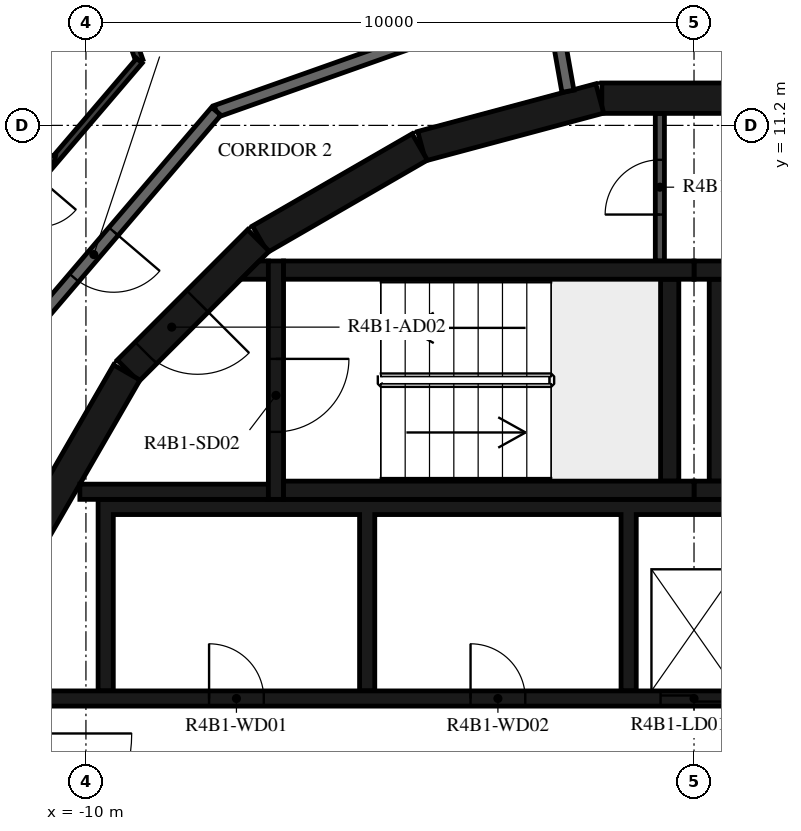
"""IFC4 building model, lengths in metres.
Left out: names, types, materials, properties, quantities, classifications, styles, units other than length and angle.
Written with IfcOpenShell. Run it as: python <this file> out.ifc"""

import sys

from ifc_helpers import new_model, si_unit, direction, frame, frame_2d, origin, place, context, subcontext, project, spatial, polyline, rectangle, outline, extrude, element, fill, save


model = new_model("IFC4")
c1 = context("Model", 3, precision=1e-05, world=origin(), true_north=direction((0.0, 1.0)))
c2 = subcontext(c1, "Body", "Model", "MODEL_VIEW")
j1 = project(units=[si_unit("LENGTHUNIT", "METRE"), si_unit("PLANEANGLEUNIT", "RADIAN")], contexts=[c1])
p1 = place(None, origin())
s1 = spatial("IfcSite", under=j1, at=p1, CompositionType="ELEMENT")
p2 = place(p1, origin())
s2 = spatial("IfcBuilding", under=s1, at=p2, CompositionType="ELEMENT")
p3 = place(p2, frame((0.0, 0.0, 162.2)))
s3 = spatial("IfcBuildingStorey", under=s2, at=p3, CompositionType="ELEMENT", Elevation=162.2)
for number, where, z_axis, x_axis in (
    (1, (1.516, 11.647, 0.0), (0.0, 0.0, 1.0), (-1.0, 0.0, 0.0)),
    (2, (-1.55, 11.643, 0.0), (0.0, 0.0, 1.0), (-0.966, -0.259, 0.0)),
    (3, (-4.51, 10.845, 0.0), (0.0, 0.0, 1.0), (-0.866, -0.5, 0.0)),
):
    element("IfcWall", number, at=place(p3, frame(where, z_axis=z_axis, x_axis=x_axis)), inside=s3, PredefinedType="SHEAR", context=c2, shape_type="SweptSolid", body=[
        extrude(rectangle(XDim=3.033, YDim=0.5, at=frame_2d((1.516, 0.0))), origin(), (0.0, 0.0, 1.0), 3.12),
    ])
p4 = place(p3, frame((-7.164, 9.308, 0.0), z_axis=(0.0, 0.0, 1.0), x_axis=(-0.707106781187, -0.707106781187, 0.0)))
e4 = element("IfcWall", 4, at=p4, inside=s3, PredefinedType="SHEAR", context=c2, shape_type="SweptSolid", body=[
    extrude(rectangle(XDim=3.032, YDim=0.5, at=frame_2d((1.516, 0.0))), origin(), (0.0, 0.0, 1.0), 3.12),
])
p5 = place(p4, frame((1.416, 0.0, 0.0)))
e5 = element("IfcOpeningElement", 5, at=p5, cuts=e4, PredefinedType="OPENING", context=c2, shape_type="SweptSolid", body=[
    extrude(rectangle(XDim=1.2, YDim=2.1, at=frame_2d((0.6, 1.05))), frame((0.0, 0.26, 0.0), z_axis=(0.0, -1.0, 0.0), x_axis=(1.0, 0.0, 0.0)), (0.0, 0.0, 1.0), 0.52),
])
p6 = place(p3, frame((-9.329, 7.137, 0.0), z_axis=(0.0, 0.0, 1.0), x_axis=(-0.500087131594, -0.865975092491, 0.0)))
e6 = element("IfcWall", 6, at=p6, inside=s3, PredefinedType="SHEAR", context=c2, shape_type="SweptSolid", body=[
    extrude(rectangle(XDim=3.033, YDim=0.5, at=frame_2d((1.516, 0.0))), origin(), (0.0, 0.0, 1.0), 3.12),
])
for number, where, z_axis, x_axis in (
    (7, (0.0, 5.2, 0.0), (0.0, 0.0, 1.0), (1.0, 0.0, 0.0)),
    (8, (0.0, 8.82, 0.0), (0.0, 0.0, 1.0), (1.0, 0.0, 0.0)),
):
    element("IfcWall", number, at=place(p3, frame(where, z_axis=z_axis, x_axis=x_axis)), inside=s3, PredefinedType="SHEAR", context=c2, shape_type="SweptSolid", body=[
        extrude(rectangle(XDim=6.75, YDim=0.3, at=frame_2d((3.375, 0.0))), origin(), (0.0, 0.0, 1.0), 3.12),
    ])
p7 = place(p3, frame((0.4, 5.35, 0.0), z_axis=(0.0, 0.0, 1.0), x_axis=(0.0, 1.0, 0.0)))
e9 = element("IfcWall", 9, at=p7, inside=s3, PredefinedType="SHEAR", context=c2, shape_type="SweptSolid", body=[
    extrude(rectangle(XDim=3.32, YDim=0.3, at=frame_2d((1.66, 0.0))), origin(), (0.0, 0.0, 1.0), 3.12),
])
for number, where, z_axis, x_axis in (
    (10, (-6.75, 5.2, 0.0), (0.0, 0.0, 1.0), (1.0, 0.0, 0.0)),
    (11, (-6.75, 8.82, 0.0), (0.0, 0.0, 1.0), (1.0, 0.0, 0.0)),
):
    element("IfcWall", number, at=place(p3, frame(where, z_axis=z_axis, x_axis=x_axis)), inside=s3, PredefinedType="SHEAR", context=c2, shape_type="SweptSolid", body=[
        extrude(rectangle(XDim=6.75, YDim=0.3, at=frame_2d((3.375, 0.0))), origin(), (0.0, 0.0, 1.0), 3.12),
    ])
p8 = place(p3, frame((-0.4, 5.35, 0.0), z_axis=(0.0, 0.0, 1.0), x_axis=(0.0, 1.0, 0.0)))
e12 = element("IfcWall", 12, at=p8, inside=s3, PredefinedType="SHEAR", context=c2, shape_type="SweptSolid", body=[
    extrude(rectangle(XDim=3.32, YDim=0.3, at=frame_2d((1.66, 0.0))), origin(), (0.0, 0.0, 1.0), 3.12),
])
p9 = place(p3, frame((-6.875, 8.97, 0.0), z_axis=(0.0, 0.0, 1.0), x_axis=(0.0, -1.0, 0.0)))
e13 = element("IfcWall", 13, at=p9, inside=s3, PredefinedType="SHEAR", context=c2, shape_type="SweptSolid", body=[
    extrude(rectangle(XDim=3.92, YDim=0.25, at=frame_2d((1.96, 0.0))), origin(), (0.0, 0.0, 1.0), 3.12),
])
p10 = place(p9, frame((1.61, 0.0, 0.0)))
e14 = element("IfcOpeningElement", 14, at=p10, cuts=e13, PredefinedType="OPENING", context=c2, shape_type="SweptSolid", body=[
    extrude(rectangle(XDim=1.2, YDim=2.1, at=frame_2d((0.6, 1.05))), frame((0.0, 0.135, 0.0), z_axis=(0.0, -1.0, 0.0), x_axis=(1.0, 0.0, 0.0)), (0.0, 0.0, 1.0), 0.27),
])
p11 = place(p3, frame((-7.0, 5.175, 0.0), z_axis=(0.0, 0.0, 1.0), x_axis=(-1.0, 0.0, 0.0)))
e15 = element("IfcWall", 15, at=p11, inside=s3, PredefinedType="SHEAR", context=c2, shape_type="SweptSolid", body=[
    extrude(rectangle(XDim=3.1, YDim=0.25, at=frame_2d((1.55, 0.0))), origin(), (0.0, 0.0, 1.0), 3.12),
])
p12 = place(p3, origin())
e16 = element("IfcWall", 16, at=p12, inside=s3, PredefinedType="SHEAR", context=c2, shape_type="SweptSolid", body=[
    extrude(outline(polyline([(-7.148, 8.97), (-7.0, 8.97), (-7.0, 8.67), (-7.448, 8.67), (-7.148, 8.97)])), origin(), (0.0, 0.0, 1.0), 3.12),
])
p13 = place(p3, origin())
e17 = element("IfcWall", 17, at=p13, inside=s3, PredefinedType="SHEAR", context=c2, shape_type="SweptSolid", body=[
    extrude(outline(polyline([(-9.55, 4.8), (-5.5, 4.8), (-5.5, 1.9), (-5.25, 1.9), (-5.25, 4.8), (-1.2, 4.8), (-1.2, 1.9), (-0.95, 1.9), (-0.95, 4.8), (0.95, 4.8), (0.95, 1.9), (1.2, 1.9), (1.2, 4.8), (3.1, 4.8), (3.1, 1.9), (3.35, 1.9), (3.35, 4.8), (5.25, 4.8), (5.25, 1.9), (5.5, 1.9), (5.5, 4.8), (7.4, 4.8), (7.4, 1.9), (7.65, 1.9), (7.65, 4.8), (9.55, 4.8), (9.55, 1.9), (9.8, 1.9), (9.8, 4.8), (9.8, 5.05), (-9.8, 5.05), (-9.8, 4.8), (-9.8, 1.9), (-9.55, 1.9), (-9.55, 4.8)])), origin(), (0.0, 0.0, 1.0), 3.12),
])
p14 = place(p3, frame((-11.28, 1.775, 0.0), z_axis=(0.0, 0.0, 1.0), x_axis=(1.0, 0.0, 0.0)))
e18 = element("IfcWall", 18, at=p14, inside=s3, PredefinedType="SHEAR", context=c2, shape_type="SweptSolid", body=[
    extrude(rectangle(XDim=14.38, YDim=0.25, at=frame_2d((7.19, 0.0))), origin(), (0.0, 0.0, 1.0), 3.12),
])
p15 = place(p14, frame((10.73, 0.0, 0.0)))
e19 = element("IfcOpeningElement", 19, at=p15, cuts=e18, PredefinedType="OPENING", context=c2, shape_type="SweptSolid", body=[
    extrude(rectangle(XDim=1.1, YDim=2.1, at=frame_2d((0.55, 1.05))), frame((0.0, 0.135, 0.0), z_axis=(0.0, -1.0, 0.0), x_axis=(1.0, 0.0, 0.0)), (0.0, 0.0, 1.0), 0.27),
])
p16 = place(p14, frame((12.88, 0.0, 0.0)))
e20 = element("IfcOpeningElement", 20, at=p16, cuts=e18, PredefinedType="OPENING", context=c2, shape_type="SweptSolid", body=[
    extrude(rectangle(XDim=1.1, YDim=2.1, at=frame_2d((0.55, 1.05))), frame((0.0, 0.135, 0.0), z_axis=(0.0, -1.0, 0.0), x_axis=(1.0, 0.0, 0.0)), (0.0, 0.0, 1.0), 0.27),
])
p17 = place(p14, frame((3.305, 0.0, 0.0)))
e21 = element("IfcOpeningElement", 21, at=p17, cuts=e18, PredefinedType="OPENING", context=c2, shape_type="SweptSolid", body=[
    extrude(rectangle(XDim=0.9, YDim=2.1, at=frame_2d((0.45, 1.05))), frame((0.0, 0.135, 0.0), z_axis=(0.0, -1.0, 0.0), x_axis=(1.0, 0.0, 0.0)), (0.0, 0.0, 1.0), 0.27),
])
p18 = place(p14, frame((7.605, 0.0, 0.0)))
e22 = element("IfcOpeningElement", 22, at=p18, cuts=e18, PredefinedType="OPENING", context=c2, shape_type="SweptSolid", body=[
    extrude(rectangle(XDim=0.9, YDim=2.1, at=frame_2d((0.45, 1.05))), frame((0.0, 0.135, 0.0), z_axis=(0.0, -1.0, 0.0), x_axis=(1.0, 0.0, 0.0)), (0.0, 0.0, 1.0), 0.27),
])
p19 = place(p3, frame((-0.562, 8.97, 0.0), z_axis=(0.0, 0.0, 1.0), x_axis=(0.0, 1.0, 0.0)))
e23 = element("IfcWall", 23, at=p19, inside=s3, PredefinedType="PARTITIONING", context=c2, shape_type="SweptSolid", body=[
    extrude(rectangle(XDim=2.427, YDim=0.15, at=frame_2d((1.214, 0.0))), origin(), (0.0, 0.0, 1.0), 3.12),
])
p20 = place(p19, frame((0.764, 0.0, 0.0)))
e24 = element("IfcOpeningElement", 24, at=p20, cuts=e23, PredefinedType="OPENING", context=c2, shape_type="SweptSolid", body=[
    extrude(rectangle(XDim=0.9, YDim=2.1, at=frame_2d((0.45, 1.05))), frame((0.0, 0.085, 0.0), z_axis=(0.0, -1.0, 0.0), x_axis=(1.0, 0.0, 0.0)), (0.0, 0.0, 1.0), 0.17),
])
p21 = place(p3, frame((-2.074, 11.761, 0.0), z_axis=(0.0, 0.0, 1.0), x_axis=(-0.1736412798, 0.984808969267, 0.0)))
e25 = element("IfcWall", 25, at=p21, inside=s3, PredefinedType="STANDARD", context=c2, shape_type="SweptSolid", body=[
    extrude(rectangle(XDim=1.644, YDim=0.2, at=frame_2d((0.822, 0.0))), origin(), (0.0, 0.0, 1.0), 3.12),
])
p22 = place(p3, frame((-2.359, 13.38, 0.0), z_axis=(0.0, 0.0, 1.0), x_axis=(-0.942647529236, -0.333789807551, 0.0)))
e26 = element("IfcWall", 26, at=p22, inside=s3, PredefinedType="STANDARD", context=c2, shape_type="SweptSolid", body=[
    extrude(rectangle(XDim=5.833, YDim=0.2, at=frame_2d((2.917, 0.0))), origin(), (0.0, 0.0, 1.0), 3.12),
])
p23 = place(p3, frame((-7.858, 11.433, 0.0), z_axis=(0.0, 0.0, 1.0), x_axis=(-0.649440801937, -0.760412154545, 0.0)))
e27 = element("IfcWall", 27, at=p23, inside=s3, PredefinedType="STANDARD", context=c2, shape_type="SweptSolid", body=[
    extrude(rectangle(XDim=7.181, YDim=0.2, at=frame_2d((3.59, 0.0))), origin(), (0.0, 0.0, 1.0), 3.12),
])
p24 = place(p23, frame((2.6, 0.0, 0.0)))
e28 = element("IfcOpeningElement", 28, at=p24, cuts=e27, PredefinedType="OPENING", context=c2, shape_type="SweptSolid", body=[
    extrude(rectangle(XDim=1.0, YDim=2.1, at=frame_2d((0.5, 1.05))), frame((0.0, 0.11, 0.0), z_axis=(0.0, -1.0, 0.0), x_axis=(1.0, 0.0, 0.0)), (0.0, 0.0, 1.0), 0.22),
])
p25 = place(p3, frame((-10.402, 15.882, 0.0), z_axis=(0.0, 0.0, 1.0), x_axis=(0.33382476952, -0.942635148536, 0.0)))
e29 = element("IfcWall", 29, at=p25, inside=s3, PredefinedType="PARTITIONING", context=c2, shape_type="SweptSolid", body=[
    extrude(rectangle(XDim=3.838, YDim=0.12, at=frame_2d((1.919, 0.0))), origin(), (0.0, 0.0, 1.0), 3.12),
])
p26 = place(p3, frame((-9.12, 12.264, 0.0), z_axis=(0.0, 0.0, 1.0), x_axis=(-0.649444490942, -0.760409003882, 0.0)))
e30 = element("IfcWall", 30, at=p26, inside=s3, PredefinedType="PARTITIONING", context=c2, shape_type="SweptSolid", body=[
    extrude(rectangle(XDim=7.395, YDim=0.12, at=frame_2d((3.697, 0.0))), origin(), (0.0, 0.0, 1.0), 3.12),
])
p27 = place(p26, frame((2.542, 0.0, 0.0)))
e31 = element("IfcOpeningElement", 31, at=p27, cuts=e30, PredefinedType="OPENING", context=c2, shape_type="SweptSolid", body=[
    extrude(rectangle(XDim=0.8, YDim=2.1, at=frame_2d((0.4, 1.05))), frame((0.0, 0.07, 0.0), z_axis=(0.0, -1.0, 0.0), x_axis=(1.0, 0.0, 0.0)), (0.0, 0.0, 1.0), 0.14),
])
p28 = place(p3, frame((-13.126, 11.12, 0.0), z_axis=(0.0, 0.0, 1.0), x_axis=(0.983257646361, -0.182220747645, 0.0)))
e32 = element("IfcWall", 32, at=p28, inside=s3, PredefinedType="PARTITIONING", context=c2, shape_type="SweptSolid", body=[
    extrude(rectangle(XDim=2.659, YDim=0.12, at=frame_2d((1.33, 0.0))), origin(), (0.0, 0.0, 1.0), 3.12),
])
p29 = place(p10, origin())
e33 = element("IfcDoor", 33, at=p29, inside=s3, OperationType="SINGLE_SWING_LEFT", PredefinedType="DOOR", context=c2, shape_type="SweptSolid", body=[
    extrude(rectangle(XDim=1.2, YDim=2.1, at=frame_2d((0.6, 1.05))), frame((0.0, 0.025, 0.0), z_axis=(0.0, -1.0, 0.0), x_axis=(1.0, 0.0, 0.0)), (0.0, 0.0, 1.0), 0.05),
])
fill(e14, e33)
p30 = place(p5, origin())
e34 = element("IfcDoor", 34, at=p30, inside=s3, OperationType="SINGLE_SWING_RIGHT", PredefinedType="DOOR", context=c2, shape_type="SweptSolid", body=[
    extrude(rectangle(XDim=1.2, YDim=2.1, at=frame_2d((0.6, 1.05))), frame((0.0, 0.025, 0.0), z_axis=(0.0, -1.0, 0.0), x_axis=(1.0, 0.0, 0.0)), (0.0, 0.0, 1.0), 0.05),
])
fill(e5, e34)
p31 = place(p15, origin())
e35 = element("IfcDoor", 35, at=p31, inside=s3, OperationType="DOUBLE_DOOR_SLIDING", PredefinedType="DOOR", context=c2, shape_type="SweptSolid", body=[
    extrude(rectangle(XDim=1.1, YDim=2.1, at=frame_2d((0.55, 1.05))), frame((0.0, 0.025, 0.0), z_axis=(0.0, -1.0, 0.0), x_axis=(1.0, 0.0, 0.0)), (0.0, 0.0, 1.0), 0.05),
])
fill(e19, e35)
p32 = place(p17, origin())
e36 = element("IfcDoor", 36, at=p32, inside=s3, OperationType="SINGLE_SWING_LEFT", PredefinedType="DOOR", context=c2, shape_type="SweptSolid", body=[
    extrude(rectangle(XDim=0.9, YDim=2.1, at=frame_2d((0.45, 1.05))), frame((0.0, 0.025, 0.0), z_axis=(0.0, -1.0, 0.0), x_axis=(1.0, 0.0, 0.0)), (0.0, 0.0, 1.0), 0.05),
])
fill(e21, e36)
p33 = place(p18, origin())
e37 = element("IfcDoor", 37, at=p33, inside=s3, OperationType="SINGLE_SWING_RIGHT", PredefinedType="DOOR", context=c2, shape_type="SweptSolid", body=[
    extrude(rectangle(XDim=0.9, YDim=2.1, at=frame_2d((0.45, 1.05))), frame((0.0, 0.025, 0.0), z_axis=(0.0, -1.0, 0.0), x_axis=(1.0, 0.0, 0.0)), (0.0, 0.0, 1.0), 0.05),
])
fill(e22, e37)
p34 = place(p20, origin())
e38 = element("IfcDoor", 38, at=p34, inside=s3, OperationType="SINGLE_SWING_LEFT", PredefinedType="DOOR", context=c2, shape_type="SweptSolid", body=[
    extrude(rectangle(XDim=0.9, YDim=2.1, at=frame_2d((0.45, 1.05))), frame((0.0, 0.025, 0.0), z_axis=(0.0, -1.0, 0.0), x_axis=(1.0, 0.0, 0.0)), (0.0, 0.0, 1.0), 0.05),
])
fill(e24, e38)
p35 = place(p24, origin())
e39 = element("IfcDoor", 39, at=p35, inside=s3, OperationType="SINGLE_SWING_LEFT", PredefinedType="DOOR", context=c2, shape_type="SweptSolid", body=[
    extrude(rectangle(XDim=1.0, YDim=2.1, at=frame_2d((0.5, 1.05))), frame((0.0, 0.025, 0.0), z_axis=(0.0, -1.0, 0.0), x_axis=(1.0, 0.0, 0.0)), (0.0, 0.0, 1.0), 0.05),
])
fill(e28, e39)
save(model, sys.argv[1])
